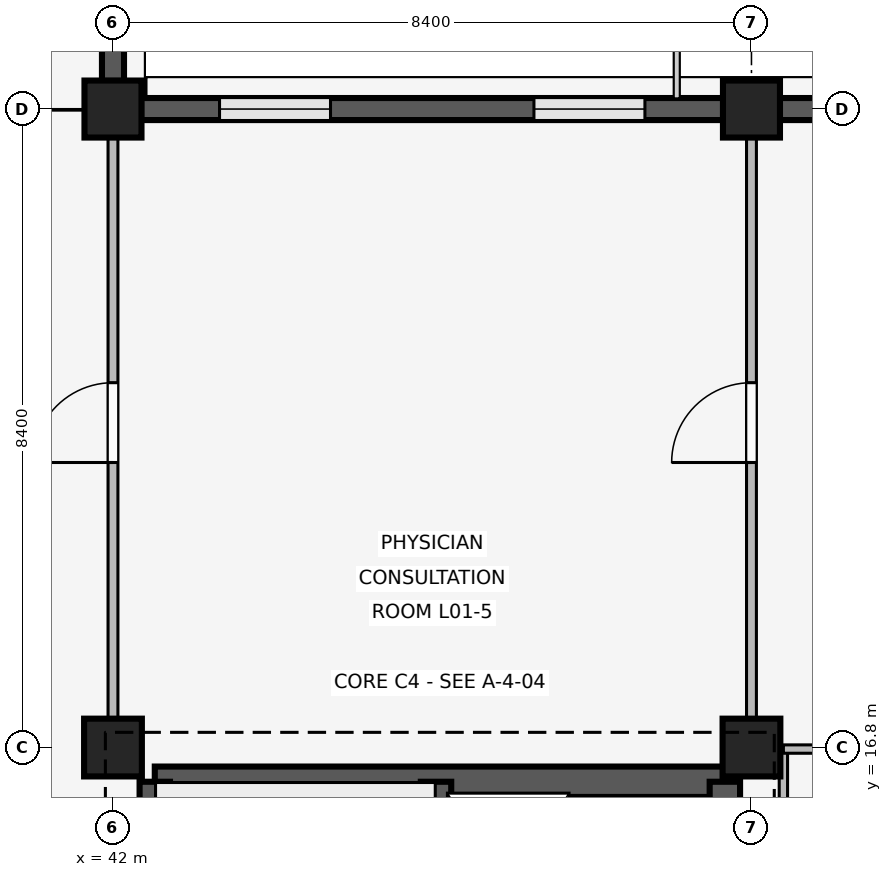
"""IFC4 building model, lengths in metres.
Left out: names, types, materials, properties, quantities, classifications, styles, units other than length and angle.
Written with IfcOpenShell. Run it as: python <this file> out.ifc"""

import sys

from ifc_helpers import new_model, si_unit, direction, frame, frame_2d, origin, origin_2d, place, context, subcontext, project, spatial, rectangle, extrude, element, fill, save


model = new_model("IFC4")
c1 = context("Model", 3, precision=1e-05, world=origin(), true_north=direction((0.0, 1.0)))
c2 = subcontext(c1, "Body", "Model", "MODEL_VIEW")
j1 = project(units=[si_unit("LENGTHUNIT", "METRE"), si_unit("PLANEANGLEUNIT", "RADIAN")], contexts=[c1])
p1 = place(None, origin())
s1 = spatial("IfcSite", under=j1, at=p1, CompositionType="ELEMENT")
p2 = place(p1, origin())
s2 = spatial("IfcBuilding", under=s1, at=p2, CompositionType="ELEMENT")
p3 = place(p2, frame((0.0, 0.0, 4.8)))
s3 = spatial("IfcBuildingStorey", under=s2, at=p3, CompositionType="ELEMENT", Elevation=4.8)
p4 = place(p3, frame((42.0, 16.8, 0.0), z_axis=(0.0, 0.0, 1.0), x_axis=(1.0, 0.0, 0.0)))
e1 = element("IfcColumn", 1, at=p4, inside=s3, PredefinedType="COLUMN", context=c2, shape_type="SweptSolid", body=[
    extrude(rectangle(XDim=0.76, YDim=0.76, at=origin_2d()), origin(), (0.0, 0.0, 1.0), 3.3),
])
p5 = place(p3, frame((42.0, 25.2, 0.0), z_axis=(0.0, 0.0, 1.0), x_axis=(1.0, 0.0, 0.0)))
e2 = element("IfcColumn", 2, at=p5, inside=s3, PredefinedType="COLUMN", context=c2, shape_type="SweptSolid", body=[
    extrude(rectangle(XDim=0.75, YDim=0.75, at=origin_2d()), origin(), (0.0, 0.0, 1.0), 3.3),
])
p6 = place(p3, frame((50.4, 16.8, 0.0), z_axis=(0.0, 0.0, 1.0), x_axis=(1.0, 0.0, 0.0)))
e3 = element("IfcColumn", 3, at=p6, inside=s3, PredefinedType="COLUMN", context=c2, shape_type="SweptSolid", body=[
    extrude(rectangle(XDim=0.76, YDim=0.76, at=origin_2d()), origin(), (0.0, 0.0, 1.0), 3.3),
])
p7 = place(p3, frame((50.4, 25.2, 0.0), z_axis=(0.0, 0.0, 1.0), x_axis=(1.0, 0.0, 0.0)))
e4 = element("IfcColumn", 4, at=p7, inside=s3, PredefinedType="COLUMN", context=c2, shape_type="SweptSolid", body=[
    extrude(rectangle(XDim=0.75, YDim=0.75, at=origin_2d()), origin(), (0.0, 0.0, 1.0), 3.3),
])
p8 = place(p3, frame((42.0, 33.23, 0.0), z_axis=(0.0, 0.0, 1.0), x_axis=(0.0, -1.0, 0.0)))
e5 = element("IfcWall", 5, at=p8, inside=s3, PredefinedType="SOLIDWALL", context=c2, shape_type="SweptSolid", body=[
    extrude(rectangle(XDim=7.66, YDim=0.29, at=frame_2d((3.83, 0.0))), origin(), (0.0, 0.0, 1.0), 2.42),
])
p9 = place(p8, frame((1.032, 0.0, 0.85)))
e6 = element("IfcOpeningElement", 6, at=p9, cuts=e5, PredefinedType="OPENING", context=c2, shape_type="SweptSolid", body=[
    extrude(rectangle(XDim=1.46, YDim=0.85, at=frame_2d((0.73, 0.425))), frame((0.0, 0.155, 0.0), z_axis=(0.0, -1.0, 0.0), x_axis=(1.0, 0.0, 0.0)), (0.0, 0.0, 1.0), 0.31),
])
p10 = place(p8, frame((5.168, 0.0, 0.85)))
e7 = element("IfcOpeningElement", 7, at=p10, cuts=e5, PredefinedType="OPENING", context=c2, shape_type="SweptSolid", body=[
    extrude(rectangle(XDim=1.46, YDim=0.85, at=frame_2d((0.73, 0.425))), frame((0.0, 0.155, 0.0), z_axis=(0.0, -1.0, 0.0), x_axis=(1.0, 0.0, 0.0)), (0.0, 0.0, 1.0), 0.31),
])
p11 = place(p3, frame((42.37, 25.2, 0.0), z_axis=(0.0, 0.0, 1.0), x_axis=(1.0, 0.0, 0.0)))
e8 = element("IfcWall", 8, at=p11, inside=s3, PredefinedType="SOLIDWALL", context=c2, shape_type="SweptSolid", body=[
    extrude(rectangle(XDim=7.66, YDim=0.29, at=frame_2d((3.83, 0.0))), origin(), (0.0, 0.0, 1.0), 2.42),
])
p12 = place(p11, frame((1.032, 0.0, 0.85)))
e9 = element("IfcOpeningElement", 9, at=p12, cuts=e8, PredefinedType="OPENING", context=c2, shape_type="SweptSolid", body=[
    extrude(rectangle(XDim=1.46, YDim=0.85, at=frame_2d((0.73, 0.425))), frame((0.0, 0.155, 0.0), z_axis=(0.0, -1.0, 0.0), x_axis=(1.0, 0.0, 0.0)), (0.0, 0.0, 1.0), 0.31),
])
p13 = place(p11, frame((5.168, 0.0, 0.85)))
e10 = element("IfcOpeningElement", 10, at=p13, cuts=e8, PredefinedType="OPENING", context=c2, shape_type="SweptSolid", body=[
    extrude(rectangle(XDim=1.46, YDim=0.85, at=frame_2d((0.73, 0.425))), frame((0.0, 0.155, 0.0), z_axis=(0.0, -1.0, 0.0), x_axis=(1.0, 0.0, 0.0)), (0.0, 0.0, 1.0), 0.31),
])
p14 = place(p3, frame((50.77, 25.2, 0.0), z_axis=(0.0, 0.0, 1.0), x_axis=(1.0, 0.0, 0.0)))
e11 = element("IfcWall", 11, at=p14, inside=s3, PredefinedType="SOLIDWALL", context=c2, shape_type="SweptSolid", body=[
    extrude(rectangle(XDim=7.66, YDim=0.29, at=frame_2d((3.83, 0.0))), origin(), (0.0, 0.0, 1.0), 2.42),
])
p15 = place(p14, frame((0.952, 0.0, 0.85)))
e12 = element("IfcOpeningElement", 12, at=p15, cuts=e11, PredefinedType="OPENING", context=c2, shape_type="SweptSolid", body=[
    extrude(rectangle(XDim=1.62, YDim=0.95, at=frame_2d((0.81, 0.475))), frame((0.0, 0.155, 0.0), z_axis=(0.0, -1.0, 0.0), x_axis=(1.0, 0.0, 0.0)), (0.0, 0.0, 1.0), 0.31),
])
p16 = place(p14, frame((5.088, 0.0, 0.85)))
e13 = element("IfcOpeningElement", 13, at=p16, cuts=e11, PredefinedType="OPENING", context=c2, shape_type="SweptSolid", body=[
    extrude(rectangle(XDim=1.62, YDim=0.95, at=frame_2d((0.81, 0.475))), frame((0.0, 0.155, 0.0), z_axis=(0.0, -1.0, 0.0), x_axis=(1.0, 0.0, 0.0)), (0.0, 0.0, 1.0), 0.31),
])
p17 = place(p3, frame((42.55, 16.35, 0.0), z_axis=(0.0, 0.0, 1.0), x_axis=(1.0, 0.0, 0.0)))
e14 = element("IfcWall", 14, at=p17, inside=s3, PredefinedType="SHEAR", context=c2, shape_type="SweptSolid", body=[
    extrude(rectangle(XDim=7.5, YDim=0.4, at=frame_2d((3.75, 0.0))), origin(), (0.0, 0.0, 1.0), 3.02),
])
p18 = place(p3, frame((42.55, 8.8, 0.0), z_axis=(0.0, 0.0, 1.0), x_axis=(0.0, 1.0, 0.0)))
e15 = element("IfcWall", 15, at=p18, inside=s3, PredefinedType="SHEAR", context=c2, shape_type="SweptSolid", body=[
    extrude(rectangle(XDim=7.55, YDim=0.4, at=frame_2d((3.775, 0.0))), origin(), (0.0, 0.0, 1.0), 3.02),
])
p19 = place(p18, frame((0.28, 0.0, 0.0)))
e16 = element("IfcOpeningElement", 16, at=p19, cuts=e15, PredefinedType="OPENING", context=c2, shape_type="SweptSolid", body=[
    extrude(rectangle(XDim=1.0, YDim=2.15, at=frame_2d((0.5, 1.075))), frame((0.0, 0.21, 0.0), z_axis=(0.0, -1.0, 0.0), x_axis=(1.0, 0.0, 0.0)), (0.0, 0.0, 1.0), 0.42),
])
p20 = place(p3, frame((50.05, 8.8, 0.0), z_axis=(0.0, 0.0, 1.0), x_axis=(0.0, 1.0, 0.0)))
e17 = element("IfcWall", 17, at=p20, inside=s3, PredefinedType="SHEAR", context=c2, shape_type="SweptSolid", body=[
    extrude(rectangle(XDim=7.55, YDim=0.4, at=frame_2d((3.775, 0.0))), origin(), (0.0, 0.0, 1.0), 3.02),
])
p21 = place(p20, frame((2.4, 0.0, 0.0)))
e18 = element("IfcOpeningElement", 18, at=p21, cuts=e17, PredefinedType="OPENING", context=c2, shape_type="SweptSolid", body=[
    extrude(rectangle(XDim=1.2, YDim=2.2, at=frame_2d((0.6, 1.1))), frame((0.0, 0.21, 0.0), z_axis=(0.0, -1.0, 0.0), x_axis=(1.0, 0.0, 0.0)), (0.0, 0.0, 1.0), 0.42),
])
p22 = place(p3, frame((46.25, 8.8, 0.0), z_axis=(0.0, 0.0, 1.0), x_axis=(0.0, 1.0, 0.0)))
e19 = element("IfcWall", 19, at=p22, inside=s3, PredefinedType="SHEAR", context=c2, shape_type="SweptSolid", body=[
    extrude(rectangle(XDim=7.55, YDim=0.4, at=frame_2d((3.775, 0.0))), origin(), (0.0, 0.0, 1.0), 3.02),
])
p23 = place(p22, frame((0.28, 0.0, 0.0)))
e20 = element("IfcOpeningElement", 20, at=p23, cuts=e19, PredefinedType="OPENING", context=c2, shape_type="SweptSolid", body=[
    extrude(rectangle(XDim=1.0, YDim=2.15, at=frame_2d((0.5, 1.075))), frame((0.0, 0.21, 0.0), z_axis=(0.0, -1.0, 0.0), x_axis=(1.0, 0.0, 0.0)), (0.0, 0.0, 1.0), 0.42),
])
p24 = place(p3, frame((42.0, 17.15, 0.0), z_axis=(0.0, 0.0, 1.0), x_axis=(0.0, 1.0, 0.0)))
e21 = element("IfcWall", 21, at=p24, inside=s3, PredefinedType="PARTITIONING", context=c2, shape_type="SweptSolid", body=[
    extrude(rectangle(XDim=7.91, YDim=0.13, at=frame_2d((3.955, 0.0))), origin(), (0.0, 0.0, 1.0), 2.4),
])
p25 = place(p24, frame((3.4, 0.0, 0.0)))
e22 = element("IfcOpeningElement", 22, at=p25, cuts=e21, PredefinedType="OPENING", context=c2, shape_type="SweptSolid", body=[
    extrude(rectangle(XDim=1.05, YDim=2.2, at=frame_2d((0.525, 1.1))), frame((0.0, 0.075, 0.0), z_axis=(0.0, -1.0, 0.0), x_axis=(1.0, 0.0, 0.0)), (0.0, 0.0, 1.0), 0.15),
])
p26 = place(p3, frame((50.4, 17.15, 0.0), z_axis=(0.0, 0.0, 1.0), x_axis=(0.0, 1.0, 0.0)))
e23 = element("IfcWall", 23, at=p26, inside=s3, PredefinedType="PARTITIONING", context=c2, shape_type="SweptSolid", body=[
    extrude(rectangle(XDim=7.91, YDim=0.13, at=frame_2d((3.955, 0.0))), origin(), (0.0, 0.0, 1.0), 2.4),
])
p27 = place(p26, frame((3.4, 0.0, 0.0)))
e24 = element("IfcOpeningElement", 24, at=p27, cuts=e23, PredefinedType="OPENING", context=c2, shape_type="SweptSolid", body=[
    extrude(rectangle(XDim=1.05, YDim=2.2, at=frame_2d((0.525, 1.1))), frame((0.0, 0.075, 0.0), z_axis=(0.0, -1.0, 0.0), x_axis=(1.0, 0.0, 0.0)), (0.0, 0.0, 1.0), 0.15),
])
p28 = place(p3, frame((50.82, 14.17, 0.0), z_axis=(0.0, 0.0, 1.0), x_axis=(0.0, 1.0, 0.0)))
e25 = element("IfcWall", 25, at=p28, inside=s3, PredefinedType="PARTITIONING", context=c2, shape_type="SweptSolid", body=[
    extrude(rectangle(XDim=2.61, YDim=0.11, at=frame_2d((1.305, 0.0))), origin(), (0.0, 0.0, 1.0), 2.4),
])
p29 = place(p3, frame((50.82, 16.78, 0.0), z_axis=(0.0, 0.0, 1.0), x_axis=(1.0, 0.0, 0.0)))
e26 = element("IfcWall", 26, at=p29, inside=s3, PredefinedType="PARTITIONING", context=c2, shape_type="SweptSolid", body=[
    extrude(rectangle(XDim=1.98, YDim=0.11, at=frame_2d((0.99, 0.0))), origin(), (0.0, 0.0, 1.0), 2.4),
])
p30 = place(p29, frame((0.54, 0.0, 0.0)))
e27 = element("IfcOpeningElement", 27, at=p30, cuts=e26, PredefinedType="OPENING", context=c2, shape_type="SweptSolid", body=[
    extrude(rectangle(XDim=0.9, YDim=2.1, at=frame_2d((0.45, 1.05))), frame((0.0, 0.065, 0.0), z_axis=(0.0, -1.0, 0.0), x_axis=(1.0, 0.0, 0.0)), (0.0, 0.0, 1.0), 0.13),
])
p31 = place(p12, origin())
e28 = element("IfcWindow", 28, at=p31, inside=s3, PartitioningType="SINGLE_PANEL", PredefinedType="WINDOW", context=c2, shape_type="SweptSolid", body=[
    extrude(rectangle(XDim=1.46, YDim=0.85, at=frame_2d((0.73, 0.425))), frame((0.0, 0.03, 0.0), z_axis=(0.0, -1.0, 0.0), x_axis=(1.0, 0.0, 0.0)), (0.0, 0.0, 1.0), 0.06),
])
fill(e9, e28)
p32 = place(p13, origin())
e29 = element("IfcWindow", 29, at=p32, inside=s3, PartitioningType="SINGLE_PANEL", PredefinedType="WINDOW", context=c2, shape_type="SweptSolid", body=[
    extrude(rectangle(XDim=1.46, YDim=0.85, at=frame_2d((0.73, 0.425))), frame((0.0, 0.03, 0.0), z_axis=(0.0, -1.0, 0.0), x_axis=(1.0, 0.0, 0.0)), (0.0, 0.0, 1.0), 0.06),
])
fill(e10, e29)
p33 = place(p25, origin())
e30 = element("IfcDoor", 30, at=p33, inside=s3, OperationType="SINGLE_SWING_LEFT", PredefinedType="DOOR", context=c2, shape_type="SweptSolid", body=[
    extrude(rectangle(XDim=1.05, YDim=2.2, at=frame_2d((0.525, 1.1))), frame((0.0, 0.025, 0.0), z_axis=(0.0, -1.0, 0.0), x_axis=(1.0, 0.0, 0.0)), (0.0, 0.0, 1.0), 0.05),
])
fill(e22, e30)
p34 = place(p27, origin())
e31 = element("IfcDoor", 31, at=p34, inside=s3, OperationType="SINGLE_SWING_LEFT", PredefinedType="DOOR", context=c2, shape_type="SweptSolid", body=[
    extrude(rectangle(XDim=1.05, YDim=2.2, at=frame_2d((0.525, 1.1))), frame((0.0, 0.025, 0.0), z_axis=(0.0, -1.0, 0.0), x_axis=(1.0, 0.0, 0.0)), (0.0, 0.0, 1.0), 0.05),
])
fill(e24, e31)
save(model, sys.argv[1])
